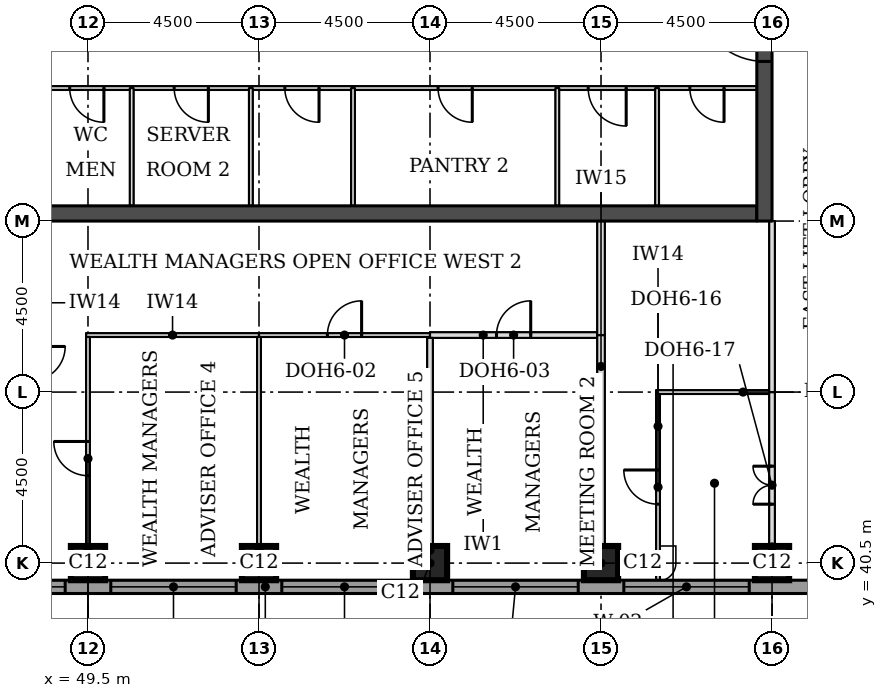
"""IFC4 building model, lengths in metres.
Left out: names, types, materials, properties, quantities, classifications, styles, units other than length and angle.
Written with IfcOpenShell. Run it as: python <this file> out.ifc"""

import sys

from ifc_helpers import new_model, si_unit, direction, frame, frame_2d, origin, origin_2d, place, context, subcontext, project, spatial, rectangle, extrude, element, fill, save


model = new_model("IFC4")
c1 = context("Model", 3, precision=1e-05, world=origin(), true_north=direction((0.0, 1.0)))
c2 = subcontext(c1, "Body", "Model", "MODEL_VIEW")
j1 = project(units=[si_unit("LENGTHUNIT", "METRE"), si_unit("PLANEANGLEUNIT", "RADIAN")], contexts=[c1])
p1 = place(None, origin())
s1 = spatial("IfcSite", under=j1, at=p1, CompositionType="ELEMENT")
p2 = place(p1, origin())
s2 = spatial("IfcBuilding", under=s1, at=p2, CompositionType="ELEMENT")
p3 = place(p2, frame((0.0, 0.0, 184.7)))
s3 = spatial("IfcBuildingStorey", under=s2, at=p3, CompositionType="ELEMENT", Elevation=184.7)
for number, where, z_axis, x_axis in (
    (1, (49.5, 40.5, 0.0), (0.0, 0.0, 1.0), (1.0, 0.0, 0.0)),
    (2, (54.0, 40.5, 0.0), (0.0, 0.0, 1.0), (1.0, 0.0, 0.0)),
    (3, (58.5, 40.5, 0.0), (0.0, 0.0, 1.0), (1.0, 0.0, 0.0)),
    (4, (63.0, 40.5, 0.0), (0.0, 0.0, 1.0), (1.0, 0.0, 0.0)),
    (5, (67.5, 40.5, 0.0), (0.0, 0.0, 1.0), (1.0, 0.0, 0.0)),
):
    element("IfcColumn", number, at=place(p3, frame(where, z_axis=z_axis, x_axis=x_axis)), inside=s3, PredefinedType="COLUMN", context=c2, shape_type="SweptSolid", body=[
        extrude(rectangle(XDim=0.9, YDim=0.9, at=origin_2d()), origin(), (0.0, 0.0, 1.0), 3.7),
    ])
p4 = place(p3, frame((45.4, 49.7, 0.0), z_axis=(0.0, 0.0, 1.0), x_axis=(1.0, 0.0, 0.0)))
e6 = element("IfcWall", 6, at=p4, inside=s3, PredefinedType="SHEAR", context=c2, shape_type="SweptSolid", body=[
    extrude(rectangle(XDim=21.7, YDim=0.4, at=frame_2d((10.85, 0.0))), origin(), (0.0, 0.0, 1.0), 3.7),
])
p5 = place(p3, frame((67.3, 49.5, 0.0), z_axis=(0.0, 0.0, 1.0), x_axis=(0.0, 1.0, 0.0)))
e7 = element("IfcWall", 7, at=p5, inside=s3, PredefinedType="SHEAR", context=c2, shape_type="SweptSolid", body=[
    extrude(rectangle(XDim=22.5, YDim=0.4, at=frame_2d((11.25, 0.0))), origin(), (0.0, 0.0, 1.0), 3.7),
])
p6 = place(p5, frame((4.2, 0.0, 0.0)))
e8 = element("IfcOpeningElement", 8, at=p6, cuts=e7, PredefinedType="OPENING", context=c2, shape_type="SweptSolid", body=[
    extrude(rectangle(XDim=1.8, YDim=2.1, at=frame_2d((0.9, 1.05))), frame((0.0, 0.21, 0.0), z_axis=(0.0, -1.0, 0.0), x_axis=(1.0, 0.0, 0.0)), (0.0, 0.0, 1.0), 0.42),
])
p7 = place(p5, frame((6.9, 0.0, 0.0)))
e9 = element("IfcOpeningElement", 9, at=p7, cuts=e7, PredefinedType="OPENING", context=c2, shape_type="SweptSolid", body=[
    extrude(rectangle(XDim=1.1, YDim=2.1, at=frame_2d((0.55, 1.05))), frame((0.0, 0.21, 0.0), z_axis=(0.0, -1.0, 0.0), x_axis=(1.0, 0.0, 0.0)), (0.0, 0.0, 1.0), 0.42),
])
p8 = place(p5, frame((13.6, 0.0, 0.0)))
e10 = element("IfcOpeningElement", 10, at=p8, cuts=e7, PredefinedType="OPENING", context=c2, shape_type="SweptSolid", body=[
    extrude(rectangle(XDim=1.1, YDim=2.1, at=frame_2d((0.55, 1.05))), frame((0.0, 0.21, 0.0), z_axis=(0.0, -1.0, 0.0), x_axis=(1.0, 0.0, 0.0)), (0.0, 0.0, 1.0), 0.42),
])
p9 = place(p5, frame((16.5, 0.0, 0.0)))
e11 = element("IfcOpeningElement", 11, at=p9, cuts=e7, PredefinedType="OPENING", context=c2, shape_type="SweptSolid", body=[
    extrude(rectangle(XDim=1.8, YDim=2.1, at=frame_2d((0.9, 1.05))), frame((0.0, 0.21, 0.0), z_axis=(0.0, -1.0, 0.0), x_axis=(1.0, 0.0, 0.0)), (0.0, 0.0, 1.0), 0.42),
])
p10 = place(p3, frame((36.0, 39.875, 0.0), z_axis=(0.0, 0.0, 1.0), x_axis=(1.0, 0.0, 0.0)))
e12 = element("IfcWall", 12, at=p10, inside=s3, PredefinedType="STANDARD", context=c2, shape_type="SweptSolid", body=[
    extrude(rectangle(XDim=36.331, YDim=0.35, at=frame_2d((18.166, 0.0))), origin(), (0.0, 0.0, 1.0), 3.525),
])
p11 = place(p10, frame((5.1, 0.0, 0.9)))
e13 = element("IfcOpeningElement", 13, at=p11, cuts=e12, PredefinedType="OPENING", context=c2, shape_type="SweptSolid", body=[
    extrude(rectangle(XDim=3.3, YDim=1.9, at=frame_2d((1.65, 0.95))), frame((0.0, 0.185, 0.0), z_axis=(0.0, -1.0, 0.0), x_axis=(1.0, 0.0, 0.0)), (0.0, 0.0, 1.0), 0.37),
])
p12 = place(p10, frame((9.6, 0.0, 0.9)))
e14 = element("IfcOpeningElement", 14, at=p12, cuts=e12, PredefinedType="OPENING", context=c2, shape_type="SweptSolid", body=[
    extrude(rectangle(XDim=3.3, YDim=1.9, at=frame_2d((1.65, 0.95))), frame((0.0, 0.185, 0.0), z_axis=(0.0, -1.0, 0.0), x_axis=(1.0, 0.0, 0.0)), (0.0, 0.0, 1.0), 0.37),
])
p13 = place(p10, frame((14.1, 0.0, 0.9)))
e15 = element("IfcOpeningElement", 15, at=p13, cuts=e12, PredefinedType="OPENING", context=c2, shape_type="SweptSolid", body=[
    extrude(rectangle(XDim=3.3, YDim=1.9, at=frame_2d((1.65, 0.95))), frame((0.0, 0.185, 0.0), z_axis=(0.0, -1.0, 0.0), x_axis=(1.0, 0.0, 0.0)), (0.0, 0.0, 1.0), 0.37),
])
p14 = place(p10, frame((18.6, 0.0, 0.9)))
e16 = element("IfcOpeningElement", 16, at=p14, cuts=e12, PredefinedType="OPENING", context=c2, shape_type="SweptSolid", body=[
    extrude(rectangle(XDim=3.3, YDim=1.9, at=frame_2d((1.65, 0.95))), frame((0.0, 0.185, 0.0), z_axis=(0.0, -1.0, 0.0), x_axis=(1.0, 0.0, 0.0)), (0.0, 0.0, 1.0), 0.37),
])
p15 = place(p10, frame((23.1, 0.0, 0.9)))
e17 = element("IfcOpeningElement", 17, at=p15, cuts=e12, PredefinedType="OPENING", context=c2, shape_type="SweptSolid", body=[
    extrude(rectangle(XDim=3.3, YDim=1.9, at=frame_2d((1.65, 0.95))), frame((0.0, 0.185, 0.0), z_axis=(0.0, -1.0, 0.0), x_axis=(1.0, 0.0, 0.0)), (0.0, 0.0, 1.0), 0.37),
])
p16 = place(p10, frame((27.6, 0.0, 0.9)))
e18 = element("IfcOpeningElement", 18, at=p16, cuts=e12, PredefinedType="OPENING", context=c2, shape_type="SweptSolid", body=[
    extrude(rectangle(XDim=3.3, YDim=1.9, at=frame_2d((1.65, 0.95))), frame((0.0, 0.185, 0.0), z_axis=(0.0, -1.0, 0.0), x_axis=(1.0, 0.0, 0.0)), (0.0, 0.0, 1.0), 0.37),
])
p17 = place(p3, frame((64.45, 45.0, 0.0), z_axis=(0.0, 0.0, 1.0), x_axis=(1.0, 0.0, 0.0)))
e19 = element("IfcWall", 19, at=p17, inside=s3, PredefinedType="PARTITIONING", context=c2, shape_type="SweptSolid", body=[
    extrude(rectangle(XDim=2.975, YDim=0.1, at=frame_2d((1.488, 0.0))), origin(), (0.0, 0.0, 1.0), 3.55),
])
p18 = place(p3, frame((49.45, 46.5, 0.0), z_axis=(0.0, 0.0, 1.0), x_axis=(1.0, 0.0, 0.0)))
e20 = element("IfcWall", 20, at=p18, inside=s3, PredefinedType="PARTITIONING", context=c2, shape_type="SweptSolid", body=[
    extrude(rectangle(XDim=4.55, YDim=0.1, at=frame_2d((2.275, 0.0))), origin(), (0.0, 0.0, 1.0), 3.55),
])
p19 = place(p3, frame((54.0, 46.5, 0.0), z_axis=(0.0, 0.0, 1.0), x_axis=(1.0, 0.0, 0.0)))
e21 = element("IfcWall", 21, at=p19, inside=s3, PredefinedType="PARTITIONING", context=c2, shape_type="SweptSolid", body=[
    extrude(rectangle(XDim=4.5, YDim=0.1, at=frame_2d((2.25, 0.0))), origin(), (0.0, 0.0, 1.0), 3.55),
])
p20 = place(p19, frame((1.8, 0.0, 0.0)))
e22 = element("IfcOpeningElement", 22, at=p20, cuts=e21, PredefinedType="OPENING", context=c2, shape_type="SweptSolid", body=[
    extrude(rectangle(XDim=0.9, YDim=2.1, at=frame_2d((0.45, 1.05))), frame((0.0, 0.06, 0.0), z_axis=(0.0, -1.0, 0.0), x_axis=(1.0, 0.0, 0.0)), (0.0, 0.0, 1.0), 0.12),
])
p21 = place(p3, frame((58.5, 46.5, 0.0), z_axis=(0.0, 0.0, 1.0), x_axis=(1.0, 0.0, 0.0)))
e23 = element("IfcWall", 23, at=p21, inside=s3, PredefinedType="PARTITIONING", context=c2, shape_type="SweptSolid", body=[
    extrude(rectangle(XDim=4.4, YDim=0.15, at=frame_2d((2.2, 0.0))), origin(), (0.0, 0.0, 1.0), 3.55),
])
p22 = place(p21, frame((1.75, 0.0, 0.0)))
e24 = element("IfcOpeningElement", 24, at=p22, cuts=e23, PredefinedType="OPENING", context=c2, shape_type="SweptSolid", body=[
    extrude(rectangle(XDim=0.9, YDim=2.1, at=frame_2d((0.45, 1.05))), frame((0.0, 0.085, 0.0), z_axis=(0.0, -1.0, 0.0), x_axis=(1.0, 0.0, 0.0)), (0.0, 0.0, 1.0), 0.17),
])
p23 = place(p3, frame((49.5, 40.05, 0.0), z_axis=(0.0, 0.0, 1.0), x_axis=(0.0, 1.0, 0.0)))
e25 = element("IfcWall", 25, at=p23, inside=s3, PredefinedType="PARTITIONING", context=c2, shape_type="SweptSolid", body=[
    extrude(rectangle(XDim=6.4, YDim=0.1, at=frame_2d((3.2, 0.0))), origin(), (0.0, 0.0, 1.0), 3.55),
])
p24 = place(p23, frame((2.75, 0.0, 0.0)))
e26 = element("IfcOpeningElement", 26, at=p24, cuts=e25, PredefinedType="OPENING", context=c2, shape_type="SweptSolid", body=[
    extrude(rectangle(XDim=0.9, YDim=2.1, at=frame_2d((0.45, 1.05))), frame((0.0, 0.06, 0.0), z_axis=(0.0, -1.0, 0.0), x_axis=(1.0, 0.0, 0.0)), (0.0, 0.0, 1.0), 0.12),
])
p25 = place(p3, frame((54.0, 40.05, 0.0), z_axis=(0.0, 0.0, 1.0), x_axis=(0.0, 1.0, 0.0)))
e27 = element("IfcWall", 27, at=p25, inside=s3, PredefinedType="PARTITIONING", context=c2, shape_type="SweptSolid", body=[
    extrude(rectangle(XDim=6.4, YDim=0.1, at=frame_2d((3.2, 0.0))), origin(), (0.0, 0.0, 1.0), 3.55),
])
p26 = place(p3, frame((58.5, 40.05, 0.0), z_axis=(0.0, 0.0, 1.0), x_axis=(0.0, 1.0, 0.0)))
e28 = element("IfcWall", 28, at=p26, inside=s3, PredefinedType="PARTITIONING", context=c2, shape_type="SweptSolid", body=[
    extrude(rectangle(XDim=6.375, YDim=0.15, at=frame_2d((3.188, 0.0))), origin(), (0.0, 0.0, 1.0), 3.55),
])
p27 = place(p3, frame((63.0, 40.05, 0.0), z_axis=(0.0, 0.0, 1.0), x_axis=(0.0, 1.0, 0.0)))
e29 = element("IfcWall", 29, at=p27, inside=s3, PredefinedType="PARTITIONING", context=c2, shape_type="SweptSolid", body=[
    extrude(rectangle(XDim=6.45, YDim=0.2, at=frame_2d((3.225, 0.0))), origin(), (0.0, 0.0, 1.0), 3.55),
])
p28 = place(p3, frame((64.5, 40.05, 0.0), z_axis=(0.0, 0.0, 1.0), x_axis=(0.0, 1.0, 0.0)))
e30 = element("IfcWall", 30, at=p28, inside=s3, PredefinedType="PARTITIONING", context=c2, shape_type="SweptSolid", body=[
    extrude(rectangle(XDim=4.9, YDim=0.1, at=frame_2d((2.45, 0.0))), origin(), (0.0, 0.0, 1.0), 3.55),
])
p29 = place(p28, frame((2.0, 0.0, 0.0)))
e31 = element("IfcOpeningElement", 31, at=p29, cuts=e30, PredefinedType="OPENING", context=c2, shape_type="SweptSolid", body=[
    extrude(rectangle(XDim=0.9, YDim=2.1, at=frame_2d((0.45, 1.05))), frame((0.0, 0.06, 0.0), z_axis=(0.0, -1.0, 0.0), x_axis=(1.0, 0.0, 0.0)), (0.0, 0.0, 1.0), 0.12),
])
p30 = place(p3, frame((67.5, 40.05, 0.0), z_axis=(0.0, 0.0, 1.0), x_axis=(0.0, 1.0, 0.0)))
e32 = element("IfcWall", 32, at=p30, inside=s3, PredefinedType="PARTITIONING", context=c2, shape_type="SweptSolid", body=[
    extrude(rectangle(XDim=4.95, YDim=0.15, at=frame_2d((2.475, 0.0))), origin(), (0.0, 0.0, 1.0), 3.022),
])
p31 = place(p30, frame((2.0, 0.0, 0.0)))
e33 = element("IfcOpeningElement", 33, at=p31, cuts=e32, PredefinedType="OPENING", context=c2, shape_type="SweptSolid", body=[
    extrude(rectangle(XDim=1.0, YDim=2.1, at=frame_2d((0.5, 1.05))), frame((0.0, 0.085, 0.0), z_axis=(0.0, -1.0, 0.0), x_axis=(1.0, 0.0, 0.0)), (0.0, 0.0, 1.0), 0.17),
])
p32 = place(p3, frame((67.5, 45.0, 0.0), z_axis=(0.0, 0.0, 1.0), x_axis=(0.0, 1.0, 0.0)))
e34 = element("IfcWall", 34, at=p32, inside=s3, PredefinedType="PARTITIONING", context=c2, shape_type="SweptSolid", body=[
    extrude(rectangle(XDim=4.5, YDim=0.15, at=frame_2d((2.25, 0.0))), origin(), (0.0, 0.0, 1.0), 3.022),
])
p33 = place(p3, frame((63.0, 46.5, 0.0), z_axis=(0.0, 0.0, 1.0), x_axis=(0.0, 1.0, 0.0)))
e35 = element("IfcWall", 35, at=p33, inside=s3, PredefinedType="PARTITIONING", context=c2, shape_type="SweptSolid", body=[
    extrude(rectangle(XDim=3.0, YDim=0.2, at=frame_2d((1.5, 0.0))), origin(), (0.0, 0.0, 1.0), 3.55),
])
p34 = place(p3, frame((45.4, 53.0, 0.0), z_axis=(0.0, 0.0, 1.0), x_axis=(1.0, 0.0, 0.0)))
e36 = element("IfcWall", 36, at=p34, inside=s3, PredefinedType="PARTITIONING", context=c2, shape_type="SweptSolid", body=[
    extrude(rectangle(XDim=21.7, YDim=0.1, at=frame_2d((10.85, 0.0))), origin(), (0.0, 0.0, 1.0), 3.55),
])
p35 = place(p34, frame((19.938, 0.0, 0.0)))
e37 = element("IfcOpeningElement", 37, at=p35, cuts=e36, PredefinedType="OPENING", context=c2, shape_type="SweptSolid", body=[
    extrude(rectangle(XDim=0.9, YDim=2.1, at=frame_2d((0.45, 1.05))), frame((0.0, 0.06, 0.0), z_axis=(0.0, -1.0, 0.0), x_axis=(1.0, 0.0, 0.0)), (0.0, 0.0, 1.0), 0.12),
])
p36 = place(p34, frame((17.262, 0.0, 0.0)))
e38 = element("IfcOpeningElement", 38, at=p36, cuts=e36, PredefinedType="OPENING", context=c2, shape_type="SweptSolid", body=[
    extrude(rectangle(XDim=1.0, YDim=2.1, at=frame_2d((0.5, 1.05))), frame((0.0, 0.06, 0.0), z_axis=(0.0, -1.0, 0.0), x_axis=(1.0, 0.0, 0.0)), (0.0, 0.0, 1.0), 0.12),
])
p37 = place(p34, frame((0.994, 0.0, 0.0)))
e39 = element("IfcOpeningElement", 39, at=p37, cuts=e36, PredefinedType="OPENING", context=c2, shape_type="SweptSolid", body=[
    extrude(rectangle(XDim=0.9, YDim=2.1, at=frame_2d((0.45, 1.05))), frame((0.0, 0.06, 0.0), z_axis=(0.0, -1.0, 0.0), x_axis=(1.0, 0.0, 0.0)), (0.0, 0.0, 1.0), 0.12),
])
p38 = place(p34, frame((3.619, 0.0, 0.0)))
e40 = element("IfcOpeningElement", 40, at=p38, cuts=e36, PredefinedType="OPENING", context=c2, shape_type="SweptSolid", body=[
    extrude(rectangle(XDim=0.9, YDim=2.1, at=frame_2d((0.45, 1.05))), frame((0.0, 0.06, 0.0), z_axis=(0.0, -1.0, 0.0), x_axis=(1.0, 0.0, 0.0)), (0.0, 0.0, 1.0), 0.12),
])
p39 = place(p34, frame((6.368, 0.0, 0.0)))
e41 = element("IfcOpeningElement", 41, at=p39, cuts=e36, PredefinedType="OPENING", context=c2, shape_type="SweptSolid", body=[
    extrude(rectangle(XDim=0.9, YDim=2.1, at=frame_2d((0.45, 1.05))), frame((0.0, 0.06, 0.0), z_axis=(0.0, -1.0, 0.0), x_axis=(1.0, 0.0, 0.0)), (0.0, 0.0, 1.0), 0.12),
])
p40 = place(p34, frame((9.28, 0.0, 0.0)))
e42 = element("IfcOpeningElement", 42, at=p40, cuts=e36, PredefinedType="OPENING", context=c2, shape_type="SweptSolid", body=[
    extrude(rectangle(XDim=0.9, YDim=2.1, at=frame_2d((0.45, 1.05))), frame((0.0, 0.06, 0.0), z_axis=(0.0, -1.0, 0.0), x_axis=(1.0, 0.0, 0.0)), (0.0, 0.0, 1.0), 0.12),
])
p41 = place(p34, frame((13.312, 0.0, 0.0)))
e43 = element("IfcOpeningElement", 43, at=p41, cuts=e36, PredefinedType="OPENING", context=c2, shape_type="SweptSolid", body=[
    extrude(rectangle(XDim=0.9, YDim=2.1, at=frame_2d((0.45, 1.05))), frame((0.0, 0.06, 0.0), z_axis=(0.0, -1.0, 0.0), x_axis=(1.0, 0.0, 0.0)), (0.0, 0.0, 1.0), 0.12),
])
for number, where, z_axis, x_axis in (
    (44, (50.65, 49.9, 0.0), (0.0, 0.0, 1.0), (0.0, 1.0, 0.0)),
    (45, (53.786, 49.9, 0.0), (0.0, 0.0, 1.0), (0.0, 1.0, 0.0)),
    (46, (56.474, 49.9, 0.0), (0.0, 0.0, 1.0), (0.0, 1.0, 0.0)),
    (47, (61.85, 49.9, 0.0), (0.0, 0.0, 1.0), (0.0, 1.0, 0.0)),
    (48, (64.475, 49.9, 0.0), (0.0, 0.0, 1.0), (0.0, 1.0, 0.0)),
):
    element("IfcWall", number, at=place(p3, frame(where, z_axis=z_axis, x_axis=x_axis)), inside=s3, PredefinedType="PARTITIONING", context=c2, shape_type="SweptSolid", body=[
        extrude(rectangle(XDim=3.1, YDim=0.1, at=frame_2d((1.55, 0.0))), origin(), (0.0, 0.0, 1.0), 3.55),
    ])
p42 = place(p12, origin())
e49 = element("IfcWindow", 49, at=p42, inside=s3, PartitioningType="SINGLE_PANEL", PredefinedType="WINDOW", context=c2, shape_type="SweptSolid", body=[
    extrude(rectangle(XDim=3.3, YDim=1.9, at=frame_2d((1.65, 0.95))), frame((0.0, 0.085, 0.0), z_axis=(0.0, -1.0, 0.0), x_axis=(1.0, 0.0, 0.0)), (0.0, 0.0, 1.0), 0.06),
])
fill(e14, e49)
p43 = place(p13, origin())
e50 = element("IfcWindow", 50, at=p43, inside=s3, PartitioningType="SINGLE_PANEL", PredefinedType="WINDOW", context=c2, shape_type="SweptSolid", body=[
    extrude(rectangle(XDim=3.3, YDim=1.9, at=frame_2d((1.65, 0.95))), frame((0.0, 0.085, 0.0), z_axis=(0.0, -1.0, 0.0), x_axis=(1.0, 0.0, 0.0)), (0.0, 0.0, 1.0), 0.06),
])
fill(e15, e50)
p44 = place(p14, origin())
e51 = element("IfcWindow", 51, at=p44, inside=s3, PartitioningType="SINGLE_PANEL", PredefinedType="WINDOW", context=c2, shape_type="SweptSolid", body=[
    extrude(rectangle(XDim=3.3, YDim=1.9, at=frame_2d((1.65, 0.95))), frame((0.0, 0.085, 0.0), z_axis=(0.0, -1.0, 0.0), x_axis=(1.0, 0.0, 0.0)), (0.0, 0.0, 1.0), 0.06),
])
fill(e16, e51)
p45 = place(p15, origin())
e52 = element("IfcWindow", 52, at=p45, inside=s3, PartitioningType="SINGLE_PANEL", PredefinedType="WINDOW", context=c2, shape_type="SweptSolid", body=[
    extrude(rectangle(XDim=3.3, YDim=1.9, at=frame_2d((1.65, 0.95))), frame((0.0, 0.085, 0.0), z_axis=(0.0, -1.0, 0.0), x_axis=(1.0, 0.0, 0.0)), (0.0, 0.0, 1.0), 0.06),
])
fill(e17, e52)
p46 = place(p16, origin())
e53 = element("IfcWindow", 53, at=p46, inside=s3, PartitioningType="SINGLE_PANEL", PredefinedType="WINDOW", context=c2, shape_type="SweptSolid", body=[
    extrude(rectangle(XDim=3.3, YDim=1.9, at=frame_2d((1.65, 0.95))), frame((0.0, 0.085, 0.0), z_axis=(0.0, -1.0, 0.0), x_axis=(1.0, 0.0, 0.0)), (0.0, 0.0, 1.0), 0.06),
])
fill(e18, e53)
p47 = place(p24, origin())
e54 = element("IfcDoor", 54, at=p47, inside=s3, OperationType="SINGLE_SWING_RIGHT", PredefinedType="DOOR", context=c2, shape_type="SweptSolid", body=[
    extrude(rectangle(XDim=0.9, YDim=2.1, at=frame_2d((0.45, 1.05))), frame((0.0, 0.025, 0.0), z_axis=(0.0, -1.0, 0.0), x_axis=(1.0, 0.0, 0.0)), (0.0, 0.0, 1.0), 0.05),
])
fill(e26, e54)
p48 = place(p20, origin())
e55 = element("IfcDoor", 55, at=p48, inside=s3, OperationType="SINGLE_SWING_RIGHT", PredefinedType="DOOR", context=c2, shape_type="SweptSolid", body=[
    extrude(rectangle(XDim=0.9, YDim=2.1, at=frame_2d((0.45, 1.05))), frame((0.0, 0.025, 0.0), z_axis=(0.0, -1.0, 0.0), x_axis=(1.0, 0.0, 0.0)), (0.0, 0.0, 1.0), 0.05),
])
fill(e22, e55)
p49 = place(p22, origin())
e56 = element("IfcDoor", 56, at=p49, inside=s3, OperationType="SINGLE_SWING_RIGHT", PredefinedType="DOOR", context=c2, shape_type="SweptSolid", body=[
    extrude(rectangle(XDim=0.9, YDim=2.1, at=frame_2d((0.45, 1.05))), frame((0.0, 0.025, 0.0), z_axis=(0.0, -1.0, 0.0), x_axis=(1.0, 0.0, 0.0)), (0.0, 0.0, 1.0), 0.05),
])
fill(e24, e56)
p50 = place(p31, origin())
e57 = element("IfcDoor", 57, at=p50, inside=s3, OperationType="DOUBLE_DOOR_SINGLE_SWING", PredefinedType="DOOR", context=c2, shape_type="SweptSolid", body=[
    extrude(rectangle(XDim=1.0, YDim=2.1, at=frame_2d((0.5, 1.05))), frame((0.0, 0.025, 0.0), z_axis=(0.0, -1.0, 0.0), x_axis=(1.0, 0.0, 0.0)), (0.0, 0.0, 1.0), 0.05),
])
fill(e33, e57)
p51 = place(p29, origin())
e58 = element("IfcDoor", 58, at=p51, inside=s3, OperationType="SINGLE_SWING_RIGHT", PredefinedType="DOOR", context=c2, shape_type="SweptSolid", body=[
    extrude(rectangle(XDim=0.9, YDim=2.1, at=frame_2d((0.45, 1.05))), frame((0.0, 0.025, 0.0), z_axis=(0.0, -1.0, 0.0), x_axis=(1.0, 0.0, 0.0)), (0.0, 0.0, 1.0), 0.05),
])
fill(e31, e58)
p52 = place(p6, origin())
e59 = element("IfcDoor", 59, at=p52, inside=s3, OperationType="SINGLE_SWING_RIGHT", PredefinedType="DOOR", context=c2, shape_type="SweptSolid", body=[
    extrude(rectangle(XDim=1.8, YDim=2.1, at=frame_2d((0.9, 1.05))), frame((0.0, 0.025, 0.0), z_axis=(0.0, -1.0, 0.0), x_axis=(1.0, 0.0, 0.0)), (0.0, 0.0, 1.0), 0.05),
])
fill(e8, e59)
p53 = place(p35, frame((0.9, 0.0, 0.0), z_axis=(0.0, 0.0, 1.0), x_axis=(-1.0, 0.0, 0.0)))
e60 = element("IfcDoor", 60, at=p53, inside=s3, OperationType="SINGLE_SWING_LEFT", PredefinedType="DOOR", context=c2, shape_type="SweptSolid", body=[
    extrude(rectangle(XDim=0.9, YDim=2.1, at=frame_2d((0.45, 1.05))), frame((0.0, 0.025, 0.0), z_axis=(0.0, -1.0, 0.0), x_axis=(1.0, 0.0, 0.0)), (0.0, 0.0, 1.0), 0.05),
])
fill(e37, e60)
p54 = place(p36, frame((1.0, 0.0, 0.0), z_axis=(0.0, 0.0, 1.0), x_axis=(-1.0, 0.0, 0.0)))
e61 = element("IfcDoor", 61, at=p54, inside=s3, OperationType="SINGLE_SWING_LEFT", PredefinedType="DOOR", context=c2, shape_type="SweptSolid", body=[
    extrude(rectangle(XDim=1.0, YDim=2.1, at=frame_2d((0.5, 1.05))), frame((0.0, 0.025, 0.0), z_axis=(0.0, -1.0, 0.0), x_axis=(1.0, 0.0, 0.0)), (0.0, 0.0, 1.0), 0.05),
])
fill(e38, e61)
p55 = place(p38, frame((0.9, 0.0, 0.0), z_axis=(0.0, 0.0, 1.0), x_axis=(-1.0, 0.0, 0.0)))
e62 = element("IfcDoor", 62, at=p55, inside=s3, OperationType="SINGLE_SWING_LEFT", PredefinedType="DOOR", context=c2, shape_type="SweptSolid", body=[
    extrude(rectangle(XDim=0.9, YDim=2.1, at=frame_2d((0.45, 1.05))), frame((0.0, 0.025, 0.0), z_axis=(0.0, -1.0, 0.0), x_axis=(1.0, 0.0, 0.0)), (0.0, 0.0, 1.0), 0.05),
])
fill(e40, e62)
p56 = place(p39, frame((0.9, 0.0, 0.0), z_axis=(0.0, 0.0, 1.0), x_axis=(-1.0, 0.0, 0.0)))
e63 = element("IfcDoor", 63, at=p56, inside=s3, OperationType="SINGLE_SWING_LEFT", PredefinedType="DOOR", context=c2, shape_type="SweptSolid", body=[
    extrude(rectangle(XDim=0.9, YDim=2.1, at=frame_2d((0.45, 1.05))), frame((0.0, 0.025, 0.0), z_axis=(0.0, -1.0, 0.0), x_axis=(1.0, 0.0, 0.0)), (0.0, 0.0, 1.0), 0.05),
])
fill(e41, e63)
p57 = place(p40, frame((0.9, 0.0, 0.0), z_axis=(0.0, 0.0, 1.0), x_axis=(-1.0, 0.0, 0.0)))
e64 = element("IfcDoor", 64, at=p57, inside=s3, OperationType="SINGLE_SWING_LEFT", PredefinedType="DOOR", context=c2, shape_type="SweptSolid", body=[
    extrude(rectangle(XDim=0.9, YDim=2.1, at=frame_2d((0.45, 1.05))), frame((0.0, 0.025, 0.0), z_axis=(0.0, -1.0, 0.0), x_axis=(1.0, 0.0, 0.0)), (0.0, 0.0, 1.0), 0.05),
])
fill(e42, e64)
p58 = place(p41, frame((0.9, 0.0, 0.0), z_axis=(0.0, 0.0, 1.0), x_axis=(-1.0, 0.0, 0.0)))
e65 = element("IfcDoor", 65, at=p58, inside=s3, OperationType="SINGLE_SWING_LEFT", PredefinedType="DOOR", context=c2, shape_type="SweptSolid", body=[
    extrude(rectangle(XDim=0.9, YDim=2.1, at=frame_2d((0.45, 1.05))), frame((0.0, 0.025, 0.0), z_axis=(0.0, -1.0, 0.0), x_axis=(1.0, 0.0, 0.0)), (0.0, 0.0, 1.0), 0.05),
])
fill(e43, e65)
save(model, sys.argv[1])
